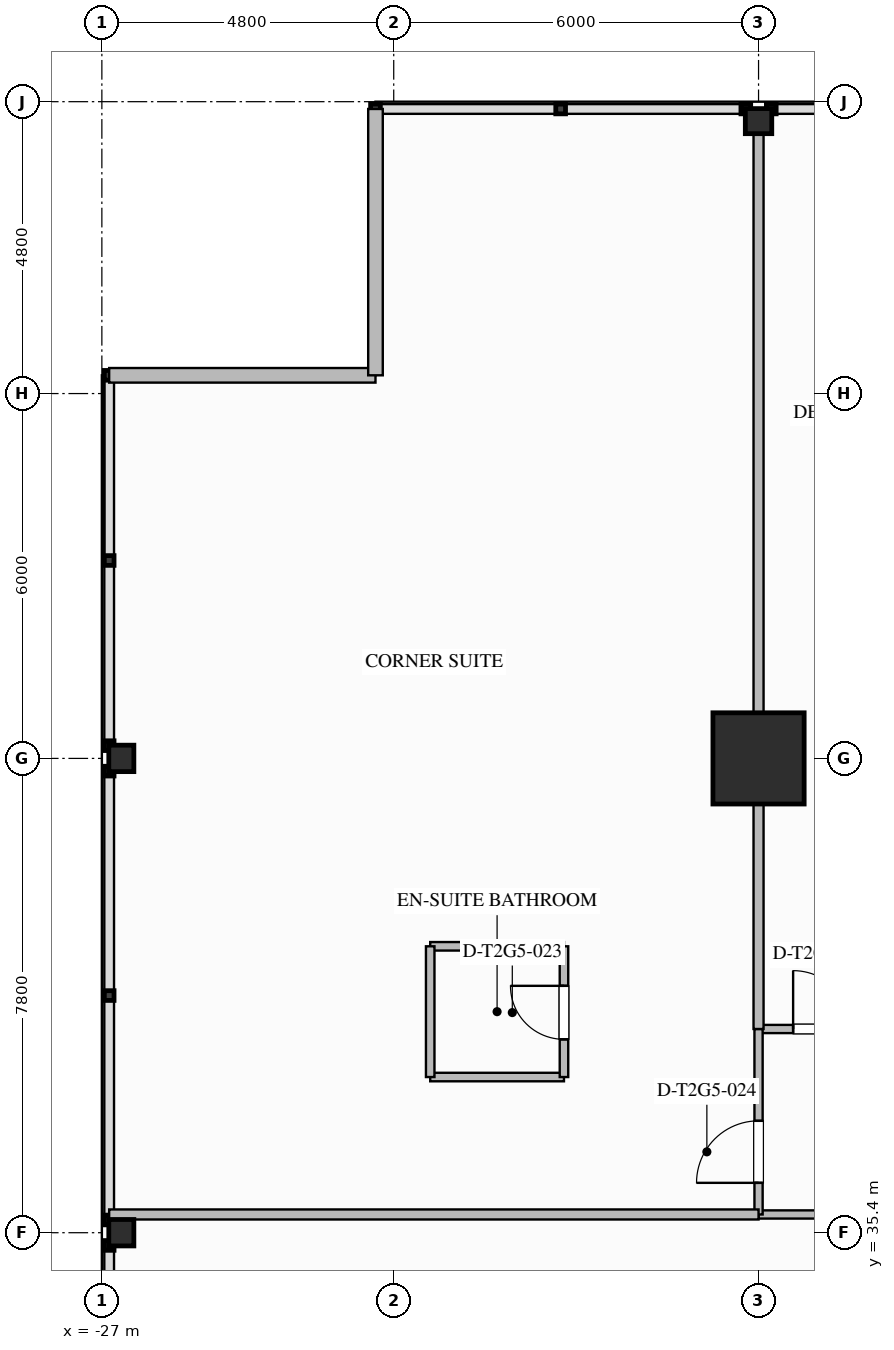
"""IFC4 building model, lengths in metres.
Left out: names, types, materials, properties, quantities, classifications, styles, units other than length and angle.
Written with IfcOpenShell. Run it as: python <this file> out.ifc"""

import sys

from ifc_helpers import new_model, si_unit, direction, frame, frame_2d, origin, origin_2d, place, context, subcontext, project, spatial, rectangle, i_section, extrude, element, fill, save


model = new_model("IFC4")
c1 = context("Model", 3, precision=1e-05, world=origin(), true_north=direction((0.0, 1.0)))
c2 = subcontext(c1, "Body", "Model", "MODEL_VIEW")
j1 = project(units=[si_unit("LENGTHUNIT", "METRE"), si_unit("PLANEANGLEUNIT", "RADIAN")], contexts=[c1])
p1 = place(None, origin())
s1 = spatial("IfcSite", under=j1, at=p1, CompositionType="ELEMENT")
p2 = place(p1, origin())
s2 = spatial("IfcBuilding", under=s1, at=p2, CompositionType="ELEMENT")
p3 = place(p2, frame((0.0, 0.0, 133.8)))
s3 = spatial("IfcBuildingStorey", under=s2, at=p3, CompositionType="ELEMENT", Elevation=133.8)
p4 = place(p3, frame((-16.2, 43.2, 0.0), z_axis=(0.0, 0.0, 1.0), x_axis=(1.0, 0.0, 0.0)))
e1 = element("IfcColumn", 1, at=p4, inside=s3, PredefinedType="COLUMN", context=c2, shape_type="SweptSolid", body=[
    extrude(rectangle(XDim=1.5, YDim=1.5, at=origin_2d()), origin(), (0.0, 0.0, 1.0), 3.5),
])
for number, where, z_axis, x_axis in (
    (2, (-26.68, 35.4, 0.0), (0.0, 0.0, 1.0), (1.0, 0.0, 0.0)),
    (3, (-26.68, 43.2, 0.0), (0.0, 0.0, 1.0), (1.0, 0.0, 0.0)),
    (4, (-16.2, 53.68, 0.0), (0.0, 0.0, 1.0), (0.0, 1.0, 0.0)),
):
    element("IfcColumn", number, at=place(p3, frame(where, z_axis=z_axis, x_axis=x_axis)), inside=s3, PredefinedType="COLUMN", context=c2, shape_type="SweptSolid", body=[
        extrude(i_section(OverallWidth=0.412, OverallDepth=0.435, WebThickness=0.036, FlangeThickness=0.057, FilletRadius=0.028, at=origin_2d()), origin(), (0.0, 0.0, 1.0), 3.497),
    ])
for number, where, z_axis, x_axis in (
    (5, (-26.88, 49.5, 0.0), (0.0, 0.0, 1.0), (1.0, 0.0, 0.0)),
    (6, (-22.5, 49.5, 0.0), (0.0, 0.0, 1.0), (0.0, 1.0, 0.0)),
):
    element("IfcWall", number, at=place(p3, frame(where, z_axis=z_axis, x_axis=x_axis)), inside=s3, PredefinedType="STANDARD", context=c2, shape_type="SweptSolid", body=[
        extrude(rectangle(XDim=4.38, YDim=0.24, at=frame_2d((2.19, 0.0))), origin(), (0.0, 0.0, 1.0), 3.24),
    ])
p5 = place(p3, frame((-16.2, 35.7, 0.0), z_axis=(0.0, 0.0, 1.0), x_axis=(1.0, 0.0, 0.0)))
e7 = element("IfcWall", 7, at=p5, inside=s3, PredefinedType="PARTITIONING", context=c2, shape_type="SweptSolid", body=[
    extrude(rectangle(XDim=5.4, YDim=0.135, at=frame_2d((2.7, 0.0))), origin(), (0.0, 0.0, 1.0), 3.24),
])
p6 = place(p3, frame((-16.2, 38.75, 0.0), z_axis=(0.0, 0.0, 1.0), x_axis=(1.0, 0.0, 0.0)))
e8 = element("IfcWall", 8, at=p6, inside=s3, PredefinedType="PARTITIONING", context=c2, shape_type="SweptSolid", body=[
    extrude(rectangle(XDim=24.9, YDim=0.135, at=frame_2d((12.45, 0.0))), origin(), (0.0, 0.0, 1.0), 3.24),
])
p7 = place(p6, frame((0.569, 0.0, 0.0)))
e9 = element("IfcOpeningElement", 9, at=p7, cuts=e8, PredefinedType="OPENING", context=c2, shape_type="SweptSolid", body=[
    extrude(rectangle(XDim=0.96, YDim=2.15, at=frame_2d((0.48, 1.075))), frame((0.0, 0.077, 0.0), z_axis=(0.0, -1.0, 0.0), x_axis=(1.0, 0.0, 0.0)), (0.0, 0.0, 1.0), 0.155),
])
p8 = place(p6, frame((7.409, 0.0, 0.0)))
e10 = element("IfcOpeningElement", 10, at=p8, cuts=e8, PredefinedType="OPENING", context=c2, shape_type="SweptSolid", body=[
    extrude(rectangle(XDim=0.96, YDim=2.15, at=frame_2d((0.48, 1.075))), frame((0.0, 0.077, 0.0), z_axis=(0.0, -1.0, 0.0), x_axis=(1.0, 0.0, 0.0)), (0.0, 0.0, 1.0), 0.155),
])
p9 = place(p6, frame((10.125, 0.0, 0.0)))
e11 = element("IfcOpeningElement", 11, at=p9, cuts=e8, PredefinedType="OPENING", context=c2, shape_type="SweptSolid", body=[
    extrude(rectangle(XDim=1.02, YDim=2.15, at=frame_2d((0.51, 1.075))), frame((0.0, 0.077, 0.0), z_axis=(0.0, -1.0, 0.0), x_axis=(1.0, 0.0, 0.0)), (0.0, 0.0, 1.0), 0.155),
])
p10 = place(p6, frame((15.26, 0.0, 0.0)))
e12 = element("IfcOpeningElement", 12, at=p10, cuts=e8, PredefinedType="OPENING", context=c2, shape_type="SweptSolid", body=[
    extrude(rectangle(XDim=0.96, YDim=2.15, at=frame_2d((0.48, 1.075))), frame((0.0, 0.077, 0.0), z_axis=(0.0, -1.0, 0.0), x_axis=(1.0, 0.0, 0.0)), (0.0, 0.0, 1.0), 0.155),
])
p11 = place(p6, frame((16.805, 0.0, 0.0)))
e13 = element("IfcOpeningElement", 13, at=p11, cuts=e8, PredefinedType="OPENING", context=c2, shape_type="SweptSolid", body=[
    extrude(rectangle(XDim=0.96, YDim=2.15, at=frame_2d((0.48, 1.075))), frame((0.0, 0.077, 0.0), z_axis=(0.0, -1.0, 0.0), x_axis=(1.0, 0.0, 0.0)), (0.0, 0.0, 1.0), 0.155),
])
p12 = place(p6, frame((23.371, 0.0, 0.0)))
e14 = element("IfcOpeningElement", 14, at=p12, cuts=e8, PredefinedType="OPENING", context=c2, shape_type="SweptSolid", body=[
    extrude(rectangle(XDim=0.96, YDim=2.15, at=frame_2d((0.48, 1.075))), frame((0.0, 0.077, 0.0), z_axis=(0.0, -1.0, 0.0), x_axis=(1.0, 0.0, 0.0)), (0.0, 0.0, 1.0), 0.155),
])
p13 = place(p3, frame((-16.2, 35.7, 0.0), z_axis=(0.0, 0.0, 1.0), x_axis=(0.0, 1.0, 0.0)))
e15 = element("IfcWall", 15, at=p13, inside=s3, PredefinedType="PARTITIONING", context=c2, shape_type="SweptSolid", body=[
    extrude(rectangle(XDim=3.05, YDim=0.135, at=frame_2d((1.525, 0.0))), origin(), (0.0, 0.0, 1.0), 2.53),
])
p14 = place(p13, frame((0.52, 0.0, 0.0)))
e16 = element("IfcOpeningElement", 16, at=p14, cuts=e15, PredefinedType="OPENING", context=c2, shape_type="SweptSolid", body=[
    extrude(rectangle(XDim=1.02, YDim=2.15, at=frame_2d((0.51, 1.075))), frame((0.0, 0.077, 0.0), z_axis=(0.0, -1.0, 0.0), x_axis=(1.0, 0.0, 0.0)), (0.0, 0.0, 1.0), 0.155),
])
p15 = place(p3, frame((-16.2, 38.75, 0.0), z_axis=(0.0, 0.0, 1.0), x_axis=(0.0, 1.0, 0.0)))
e17 = element("IfcWall", 17, at=p15, inside=s3, PredefinedType="PARTITIONING", context=c2, shape_type="SweptSolid", body=[
    extrude(rectangle(XDim=15.13, YDim=0.165, at=frame_2d((7.565, 0.0))), origin(), (0.0, 0.0, 1.0), 2.53),
])
p16 = place(p3, frame((-26.88, 35.7, 0.0), z_axis=(0.0, 0.0, 1.0), x_axis=(1.0, 0.0, 0.0)))
e18 = element("IfcWall", 18, at=p16, inside=s3, PredefinedType="PARTITIONING", context=c2, shape_type="SweptSolid", body=[
    extrude(rectangle(XDim=10.68, YDim=0.165, at=frame_2d((5.34, 0.0))), origin(), (0.0, 0.0, 1.0), 2.53),
])
for number, where, z_axis, x_axis in (
    (19, (-21.6, 37.96, 0.0), (0.0, 0.0, 1.0), (1.0, 0.0, 0.0)),
    (20, (-21.6, 40.11, 0.0), (0.0, 0.0, 1.0), (1.0, 0.0, 0.0)),
):
    element("IfcWall", number, at=place(p3, frame(where, z_axis=z_axis, x_axis=x_axis)), inside=s3, PredefinedType="PLUMBINGWALL", context=c2, shape_type="SweptSolid", body=[
        extrude(rectangle(XDim=2.2, YDim=0.14, at=frame_2d((1.1, 0.0))), origin(), (0.0, 0.0, 1.0), 3.24),
    ])
p17 = place(p3, frame((-21.6, 37.96, 0.0), z_axis=(0.0, 0.0, 1.0), x_axis=(0.0, 1.0, 0.0)))
e21 = element("IfcWall", 21, at=p17, inside=s3, PredefinedType="PLUMBINGWALL", context=c2, shape_type="SweptSolid", body=[
    extrude(rectangle(XDim=2.15, YDim=0.14, at=frame_2d((1.075, 0.0))), origin(), (0.0, 0.0, 1.0), 3.24),
])
p18 = place(p3, frame((-19.4, 37.96, 0.0), z_axis=(0.0, 0.0, 1.0), x_axis=(0.0, 1.0, 0.0)))
e22 = element("IfcWall", 22, at=p18, inside=s3, PredefinedType="PLUMBINGWALL", context=c2, shape_type="SweptSolid", body=[
    extrude(rectangle(XDim=2.15, YDim=0.14, at=frame_2d((1.075, 0.0))), origin(), (0.0, 0.0, 1.0), 3.24),
])
p19 = place(p18, frame((0.62, 0.0, 0.0)))
e23 = element("IfcOpeningElement", 23, at=p19, cuts=e22, PredefinedType="OPENING", context=c2, shape_type="SweptSolid", body=[
    extrude(rectangle(XDim=0.88, YDim=2.1, at=frame_2d((0.44, 1.05))), frame((0.0, 0.08, 0.0), z_axis=(0.0, -1.0, 0.0), x_axis=(1.0, 0.0, 0.0)), (0.0, 0.0, 1.0), 0.16),
])
p20 = place(p19, origin())
e24 = element("IfcDoor", 24, at=p20, inside=s3, OperationType="SINGLE_SWING_RIGHT", PredefinedType="DOOR", context=c2, shape_type="SweptSolid", body=[
    extrude(rectangle(XDim=0.88, YDim=2.1, at=frame_2d((0.44, 1.05))), frame((0.0, 0.025, 0.0), z_axis=(0.0, -1.0, 0.0), x_axis=(1.0, 0.0, 0.0)), (0.0, 0.0, 1.0), 0.05),
])
fill(e23, e24)
p21 = place(p14, origin())
e25 = element("IfcDoor", 25, at=p21, inside=s3, OperationType="SINGLE_SWING_LEFT", PredefinedType="DOOR", context=c2, shape_type="SweptSolid", body=[
    extrude(rectangle(XDim=1.02, YDim=2.15, at=frame_2d((0.51, 1.075))), frame((0.0, 0.025, 0.0), z_axis=(0.0, -1.0, 0.0), x_axis=(1.0, 0.0, 0.0)), (0.0, 0.0, 1.0), 0.05),
])
fill(e16, e25)
p22 = place(p7, origin())
e26 = element("IfcDoor", 26, at=p22, inside=s3, OperationType="SINGLE_SWING_LEFT", PredefinedType="DOOR", context=c2, shape_type="SweptSolid", body=[
    extrude(rectangle(XDim=0.96, YDim=2.15, at=frame_2d((0.48, 1.075))), frame((0.0, 0.025, 0.0), z_axis=(0.0, -1.0, 0.0), x_axis=(1.0, 0.0, 0.0)), (0.0, 0.0, 1.0), 0.05),
])
fill(e9, e26)
save(model, sys.argv[1])
